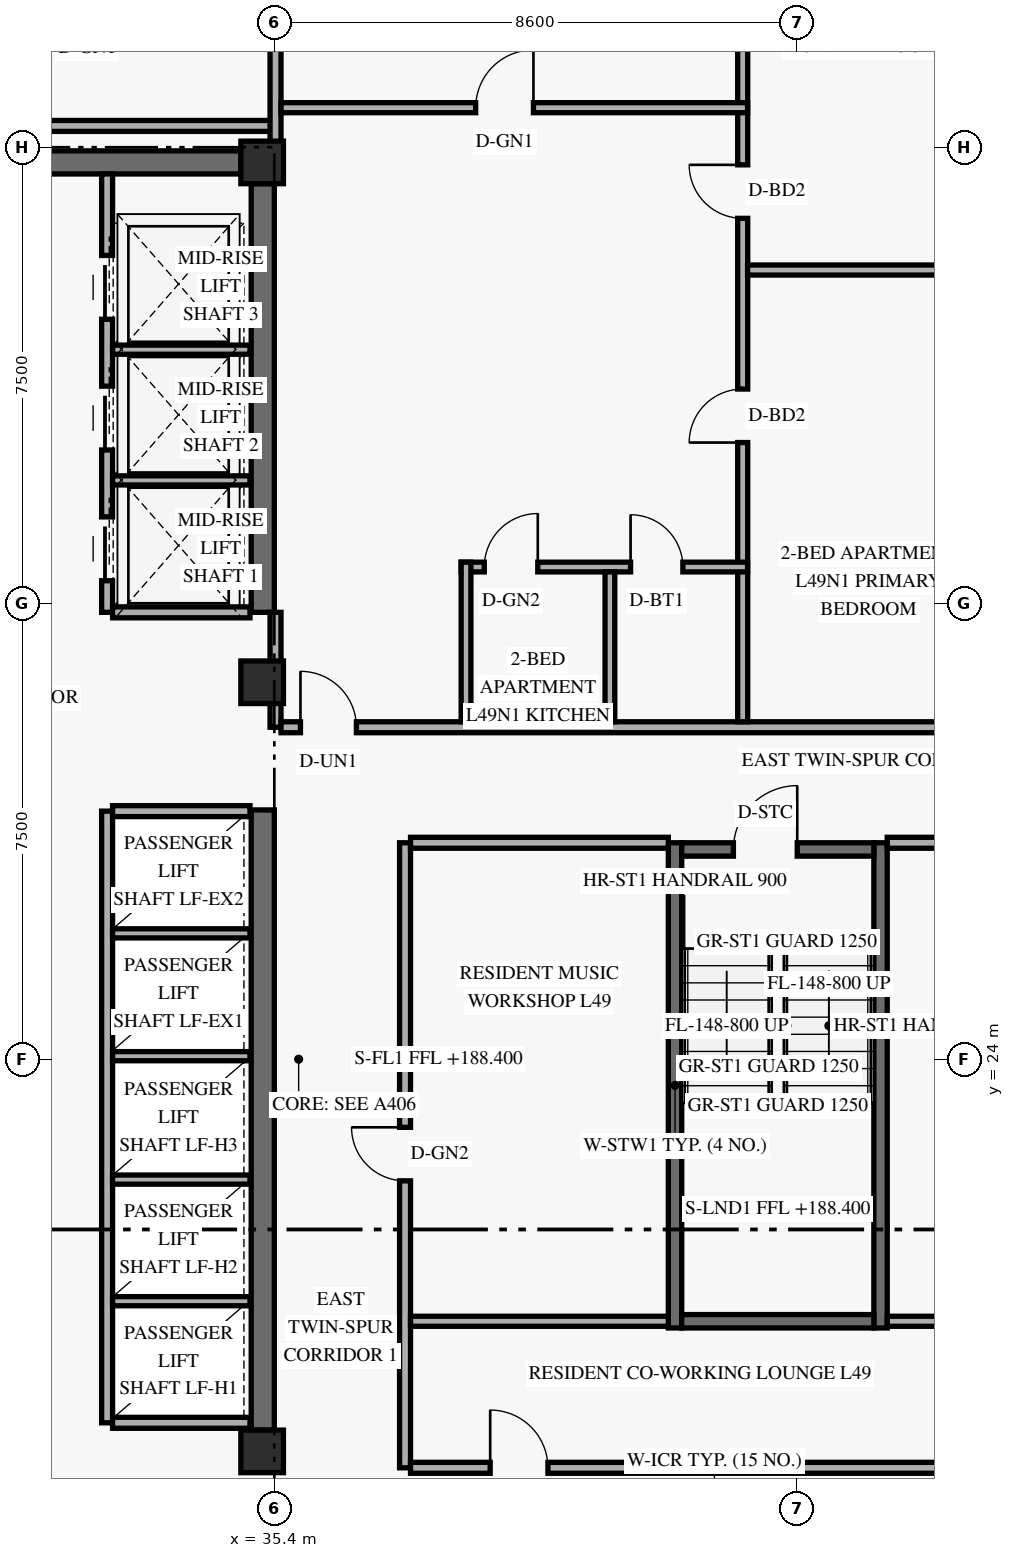
"""IFC4 building model, lengths in metres.
Left out: names, types, materials, properties, quantities, classifications, styles, units other than length and angle.
Written with IfcOpenShell. Run it as: python <this file> out.ifc"""

import sys

from ifc_helpers import new_model, si_unit, direction, frame, frame_2d, origin, origin_2d, place, context, subcontext, project, spatial, rectangle, extrude, element, fill, save


model = new_model("IFC4")
c1 = context("Model", 3, precision=1e-05, world=origin(), true_north=direction((0.0, 1.0)))
c2 = subcontext(c1, "Body", "Model", "MODEL_VIEW")
j1 = project(units=[si_unit("LENGTHUNIT", "METRE"), si_unit("PLANEANGLEUNIT", "RADIAN")], contexts=[c1])
p1 = place(None, origin())
s1 = spatial("IfcSite", under=j1, at=p1, CompositionType="ELEMENT")
p2 = place(p1, origin())
s2 = spatial("IfcBuilding", under=s1, at=p2, CompositionType="ELEMENT")
p3 = place(p2, frame((0.0, 0.0, 188.4)))
s3 = spatial("IfcBuildingStorey", under=s2, at=p3, CompositionType="ELEMENT", Elevation=188.4)
p4 = place(p3, frame((35.21, 17.9, 0.0), z_axis=(0.0, 0.0, 1.0), x_axis=(0.0, 1.0, 0.0)))
e1 = element("IfcWall", 1, at=p4, inside=s3, PredefinedType="SHEAR", context=c2, shape_type="SweptSolid", body=[
    extrude(rectangle(XDim=10.2, YDim=0.38, at=frame_2d((5.1, 0.0))), origin(), (0.0, 0.0, 1.0), 2.738),
])
p5 = place(p3, frame((35.21, 31.35, 0.0), z_axis=(0.0, 0.0, 1.0), x_axis=(0.0, 1.0, 0.0)))
e2 = element("IfcWall", 2, at=p5, inside=s3, PredefinedType="SHEAR", context=c2, shape_type="SweptSolid", body=[
    extrude(rectangle(XDim=7.05, YDim=0.38, at=frame_2d((3.525, 0.0))), origin(), (0.0, 0.0, 1.0), 2.738),
])
p6 = place(p3, frame((24.55, 38.75, 0.0), z_axis=(0.0, 0.0, 1.0), x_axis=(1.0, 0.0, 0.0)))
e3 = element("IfcWall", 3, at=p6, inside=s3, PredefinedType="SHEAR", context=c2, shape_type="SweptSolid", body=[
    extrude(rectangle(XDim=10.3, YDim=0.38, at=frame_2d((5.15, 0.0))), origin(), (0.0, 0.0, 1.0), 3.35),
])
p7 = place(p6, frame((5.2, 0.0, 0.0)))
e4 = element("IfcOpeningElement", 4, at=p7, cuts=e3, PredefinedType="OPENING", context=c2, shape_type="SweptSolid", body=[
    extrude(rectangle(XDim=1.05, YDim=2.15, at=frame_2d((0.525, 1.075))), frame((0.0, 0.2, 0.0), z_axis=(0.0, -1.0, 0.0), x_axis=(1.0, 0.0, 0.0)), (0.0, 0.0, 1.0), 0.4),
])
for number, where, z_axis, x_axis in (
    (5, (41.99, 19.58, 0.0), (0.0, 0.0, 1.0), (0.0, 1.0, 0.0)),
    (6, (45.37, 19.58, 0.0), (0.0, 0.0, 1.0), (0.0, 1.0, 0.0)),
):
    element("IfcWall", number, at=place(p3, frame(where, z_axis=z_axis, x_axis=x_axis)), inside=s3, PredefinedType="SHEAR", context=c2, shape_type="SweptSolid", body=[
        extrude(rectangle(XDim=7.98, YDim=0.22, at=frame_2d((3.99, 0.0))), origin(), (0.0, 0.0, 1.0), 2.739),
    ])
p8 = place(p3, frame((42.1, 19.69, 0.0), z_axis=(0.0, 0.0, 1.0), x_axis=(1.0, 0.0, 0.0)))
e7 = element("IfcWall", 7, at=p8, inside=s3, PredefinedType="SHEAR", context=c2, shape_type="SweptSolid", body=[
    extrude(rectangle(XDim=3.16, YDim=0.22, at=frame_2d((1.58, 0.0))), origin(), (0.0, 0.0, 1.0), 2.739),
])
p9 = place(p3, frame((42.1, 27.45, 0.0), z_axis=(0.0, 0.0, 1.0), x_axis=(1.0, 0.0, 0.0)))
e8 = element("IfcWall", 8, at=p9, inside=s3, PredefinedType="SHEAR", context=c2, shape_type="SweptSolid", body=[
    extrude(rectangle(XDim=3.16, YDim=0.22, at=frame_2d((1.58, 0.0))), origin(), (0.0, 0.0, 1.0), 2.739),
])
p10 = place(p9, frame((0.85, 0.0, 0.0)))
e9 = element("IfcOpeningElement", 9, at=p10, cuts=e8, PredefinedType="OPENING", context=c2, shape_type="SweptSolid", body=[
    extrude(rectangle(XDim=1.05, YDim=2.15, at=frame_2d((0.525, 1.075))), frame((0.0, 0.12, 0.0), z_axis=(0.0, -1.0, 0.0), x_axis=(1.0, 0.0, 0.0)), (0.0, 0.0, 1.0), 0.24),
])
for number, where, z_axis, x_axis in (
    (10, (35.2, 17.55, 0.0), (0.0, 0.0, 1.0), (1.0, 0.0, 0.0)),
    (11, (35.2, 30.2, 0.0), (0.0, 0.0, 1.0), (1.0, 0.0, 0.0)),
    (12, (35.2, 38.75, 0.0), (0.0, 0.0, 1.0), (1.0, 0.0, 0.0)),
):
    element("IfcColumn", number, at=place(p3, frame(where, z_axis=z_axis, x_axis=x_axis)), inside=s3, PredefinedType="COLUMN", context=c2, shape_type="SweptSolid", body=[
        extrude(rectangle(XDim=0.7, YDim=0.7, at=origin_2d()), origin(), (0.0, 0.0, 1.0), 3.6),
    ])
p11 = place(p3, frame((32.65, 18.02, 0.0), z_axis=(0.0, 0.0, 1.0), x_axis=(0.0, 1.0, 0.0)))
e13 = element("IfcWall", 13, at=p11, inside=s3, PredefinedType="STANDARD", context=c2, shape_type="SweptSolid", body=[
    extrude(rectangle(XDim=10.06, YDim=0.18, at=frame_2d((5.03, 0.0))), origin(), (0.0, 0.0, 1.0), 3.35),
])
for number, where, z_axis, x_axis in (
    (14, (32.74, 18.02, 0.0), (0.0, 0.0, 1.0), (1.0, 0.0, 0.0)),
    (15, (32.74, 28.08, 0.0), (0.0, 0.0, 1.0), (1.0, 0.0, 0.0)),
):
    element("IfcWall", number, at=place(p3, frame(where, z_axis=z_axis, x_axis=x_axis)), inside=s3, PredefinedType="STANDARD", context=c2, shape_type="SweptSolid", body=[
        extrude(rectangle(XDim=2.26, YDim=0.18, at=frame_2d((1.13, 0.0))), origin(), (0.0, 0.0, 1.0), 3.35),
    ])
for number, where, z_axis, x_axis in (
    (16, (32.74, 20.02, 0.0), (0.0, 0.0, 1.0), (1.0, 0.0, 0.0)),
    (17, (32.74, 22.02, 0.0), (0.0, 0.0, 1.0), (1.0, 0.0, 0.0)),
    (18, (32.74, 24.05, 0.0), (0.0, 0.0, 1.0), (1.0, 0.0, 0.0)),
    (19, (32.74, 26.07, 0.0), (0.0, 0.0, 1.0), (1.0, 0.0, 0.0)),
):
    element("IfcWall", number, at=place(p3, frame(where, z_axis=z_axis, x_axis=x_axis)), inside=s3, PredefinedType="STANDARD", context=c2, shape_type="SweptSolid", body=[
        extrude(rectangle(XDim=2.26, YDim=0.15, at=frame_2d((1.13, 0.0))), origin(), (0.0, 0.0, 1.0), 3.35),
    ])
p12 = place(p3, frame((32.65, 31.35, 0.0), z_axis=(0.0, 0.0, 1.0), x_axis=(0.0, 1.0, 0.0)))
e20 = element("IfcWall", 20, at=p12, inside=s3, PredefinedType="STANDARD", context=c2, shape_type="SweptSolid", body=[
    extrude(rectangle(XDim=7.21, YDim=0.18, at=frame_2d((3.605, 0.0))), origin(), (0.0, 0.0, 1.0), 3.35),
])
p13 = place(p12, frame((0.52, 0.0, 0.0)))
e21 = element("IfcOpeningElement", 21, at=p13, cuts=e20, PredefinedType="OPENING", context=c2, shape_type="SweptSolid", body=[
    extrude(rectangle(XDim=1.05, YDim=2.2, at=frame_2d((0.525, 1.1))), frame((0.0, 0.1, 0.0), z_axis=(0.0, -1.0, 0.0), x_axis=(1.0, 0.0, 0.0)), (0.0, 0.0, 1.0), 0.2),
])
p14 = place(p12, frame((2.67, 0.0, 0.0)))
e22 = element("IfcOpeningElement", 22, at=p14, cuts=e20, PredefinedType="OPENING", context=c2, shape_type="SweptSolid", body=[
    extrude(rectangle(XDim=1.05, YDim=2.2, at=frame_2d((0.525, 1.1))), frame((0.0, 0.1, 0.0), z_axis=(0.0, -1.0, 0.0), x_axis=(1.0, 0.0, 0.0)), (0.0, 0.0, 1.0), 0.2),
])
p15 = place(p12, frame((4.82, 0.0, 0.0)))
e23 = element("IfcOpeningElement", 23, at=p15, cuts=e20, PredefinedType="OPENING", context=c2, shape_type="SweptSolid", body=[
    extrude(rectangle(XDim=1.05, YDim=2.2, at=frame_2d((0.525, 1.1))), frame((0.0, 0.1, 0.0), z_axis=(0.0, -1.0, 0.0), x_axis=(1.0, 0.0, 0.0)), (0.0, 0.0, 1.0), 0.2),
])
p16 = place(p3, frame((32.74, 31.35, 0.0), z_axis=(0.0, 0.0, 1.0), x_axis=(1.0, 0.0, 0.0)))
e24 = element("IfcWall", 24, at=p16, inside=s3, PredefinedType="STANDARD", context=c2, shape_type="SweptSolid", body=[
    extrude(rectangle(XDim=2.26, YDim=0.18, at=frame_2d((1.13, 0.0))), origin(), (0.0, 0.0, 1.0), 3.35),
])
for number, where, z_axis, x_axis in (
    (25, (32.74, 33.52, 0.0), (0.0, 0.0, 1.0), (1.0, 0.0, 0.0)),
    (26, (32.74, 35.67, 0.0), (0.0, 0.0, 1.0), (1.0, 0.0, 0.0)),
):
    element("IfcWall", number, at=place(p3, frame(where, z_axis=z_axis, x_axis=x_axis)), inside=s3, PredefinedType="STANDARD", context=c2, shape_type="SweptSolid", body=[
        extrude(rectangle(XDim=2.26, YDim=0.15, at=frame_2d((1.13, 0.0))), origin(), (0.0, 0.0, 1.0), 3.35),
    ])
p17 = place(p3, frame((37.55, 17.28, 0.0), z_axis=(0.0, 0.0, 1.0), x_axis=(0.0, 1.0, 0.0)))
e27 = element("IfcWall", 27, at=p17, inside=s3, PredefinedType="STANDARD", context=c2, shape_type="SweptSolid", body=[
    extrude(rectangle(XDim=10.28, YDim=0.18, at=frame_2d((5.14, 0.0))), origin(), (0.0, 0.0, 1.0), 2.72),
])
p18 = place(p17, frame((4.72, 0.0, 0.0)))
e28 = element("IfcOpeningElement", 28, at=p18, cuts=e27, PredefinedType="OPENING", context=c2, shape_type="SweptSolid", body=[
    extrude(rectangle(XDim=0.88, YDim=2.12, at=frame_2d((0.44, 1.06))), frame((0.0, 0.1, 0.0), z_axis=(0.0, -1.0, 0.0), x_axis=(1.0, 0.0, 0.0)), (0.0, 0.0, 1.0), 0.2),
])
p19 = place(p3, frame((37.64, 17.28, 0.0), z_axis=(0.0, 0.0, 1.0), x_axis=(1.0, 0.0, 0.0)))
e29 = element("IfcWall", 29, at=p19, inside=s3, PredefinedType="STANDARD", context=c2, shape_type="SweptSolid", body=[
    extrude(rectangle(XDim=9.603, YDim=0.18, at=frame_2d((4.802, 0.0))), origin(), (0.0, 0.0, 1.0), 2.72),
])
p20 = place(p19, frame((1.31, 0.0, 0.0)))
e30 = element("IfcOpeningElement", 30, at=p20, cuts=e29, PredefinedType="OPENING", context=c2, shape_type="SweptSolid", body=[
    extrude(rectangle(XDim=0.95, YDim=2.15, at=frame_2d((0.475, 1.075))), frame((0.0, 0.1, 0.0), z_axis=(0.0, -1.0, 0.0), x_axis=(1.0, 0.0, 0.0)), (0.0, 0.0, 1.0), 0.2),
])
p21 = place(p3, frame((37.64, 27.56, 0.0), z_axis=(0.0, 0.0, 1.0), x_axis=(1.0, 0.0, 0.0)))
e31 = element("IfcWall", 31, at=p21, inside=s3, PredefinedType="STANDARD", context=c2, shape_type="SweptSolid", body=[
    extrude(rectangle(XDim=4.24, YDim=0.18, at=frame_2d((2.12, 0.0))), origin(), (0.0, 0.0, 1.0), 2.72),
])
p22 = place(p3, frame((45.48, 27.56, 0.0), z_axis=(0.0, 0.0, 1.0), x_axis=(1.0, 0.0, 0.0)))
e32 = element("IfcWall", 32, at=p22, inside=s3, PredefinedType="STANDARD", context=c2, shape_type="SweptSolid", body=[
    extrude(rectangle(XDim=1.763, YDim=0.18, at=frame_2d((0.881, 0.0))), origin(), (0.0, 0.0, 1.0), 2.72),
])
p23 = place(p3, frame((35.42, 29.46, 0.0), z_axis=(0.0, 0.0, 1.0), x_axis=(0.0, 1.0, 0.0)))
e33 = element("IfcWall", 33, at=p23, inside=s3, PredefinedType="STANDARD", context=c2, shape_type="SweptSolid", body=[
    extrude(rectangle(XDim=1.89, YDim=0.18, at=frame_2d((0.945, 0.0))), origin(), (0.0, 0.0, 1.0), 2.72),
])
p24 = place(p3, frame((35.51, 29.46, 0.0), z_axis=(0.0, 0.0, 1.0), x_axis=(1.0, 0.0, 0.0)))
e34 = element("IfcWall", 34, at=p24, inside=s3, PredefinedType="STANDARD", context=c2, shape_type="SweptSolid", body=[
    extrude(rectangle(XDim=11.733, YDim=0.18, at=frame_2d((5.866, 0.0))), origin(), (0.0, 0.0, 1.0), 2.72),
])
p25 = place(p24, frame((0.32, 0.0, 0.0)))
e35 = element("IfcOpeningElement", 35, at=p25, cuts=e34, PredefinedType="OPENING", context=c2, shape_type="SweptSolid", body=[
    extrude(rectangle(XDim=0.92, YDim=2.15, at=frame_2d((0.46, 1.075))), frame((0.0, 0.1, 0.0), z_axis=(0.0, -1.0, 0.0), x_axis=(1.0, 0.0, 0.0)), (0.0, 0.0, 1.0), 0.2),
])
p26 = place(p3, frame((23.85, 39.35, 0.0), z_axis=(0.0, 0.0, 1.0), x_axis=(1.0, 0.0, 0.0)))
e36 = element("IfcWall", 36, at=p26, inside=s3, PredefinedType="STANDARD", context=c2, shape_type="SweptSolid", body=[
    extrude(rectangle(XDim=11.57, YDim=0.18, at=frame_2d((5.785, 0.0))), origin(), (0.0, 0.0, 1.0), 2.72),
])
p27 = place(p3, frame((35.42, 38.75, 0.0), z_axis=(0.0, 0.0, 1.0), x_axis=(0.0, 1.0, 0.0)))
e37 = element("IfcWall", 37, at=p27, inside=s3, PredefinedType="PARTITIONING", context=c2, shape_type="SweptSolid", body=[
    extrude(rectangle(XDim=4.97, YDim=0.18, at=frame_2d((2.485, 0.0))), origin(), (0.0, 0.0, 1.0), 2.72),
])
p28 = place(p3, frame((43.103, 29.55, 0.0), z_axis=(0.0, 0.0, 1.0), x_axis=(0.0, 1.0, 0.0)))
e38 = element("IfcWall", 38, at=p28, inside=s3, PredefinedType="PARTITIONING", context=c2, shape_type="SweptSolid", body=[
    extrude(rectangle(XDim=14.17, YDim=0.165, at=frame_2d((7.085, 0.0))), origin(), (0.0, 0.0, 1.0), 2.72),
])
p29 = place(p28, frame((4.593, 0.0, 0.0)))
e39 = element("IfcOpeningElement", 39, at=p29, cuts=e38, PredefinedType="OPENING", context=c2, shape_type="SweptSolid", body=[
    extrude(rectangle(XDim=0.88, YDim=2.14, at=frame_2d((0.44, 1.07))), frame((0.0, 0.093, 0.0), z_axis=(0.0, -1.0, 0.0), x_axis=(1.0, 0.0, 0.0)), (0.0, 0.0, 1.0), 0.185),
])
p30 = place(p28, frame((8.28, 0.0, 0.0)))
e40 = element("IfcOpeningElement", 40, at=p30, cuts=e38, PredefinedType="OPENING", context=c2, shape_type="SweptSolid", body=[
    extrude(rectangle(XDim=0.88, YDim=2.14, at=frame_2d((0.44, 1.07))), frame((0.0, 0.093, 0.0), z_axis=(0.0, -1.0, 0.0), x_axis=(1.0, 0.0, 0.0)), (0.0, 0.0, 1.0), 0.185),
])
p31 = place(p3, frame((38.473, 32.095, 0.0), z_axis=(0.0, 0.0, 1.0), x_axis=(1.0, 0.0, 0.0)))
e41 = element("IfcWall", 41, at=p31, inside=s3, PredefinedType="PLUMBINGWALL", context=c2, shape_type="SweptSolid", body=[
    extrude(rectangle(XDim=4.71, YDim=0.16, at=frame_2d((2.355, 0.0))), origin(), (0.0, 0.0, 1.0), 3.35),
])
p32 = place(p31, frame((0.38, 0.0, 0.0)))
e42 = element("IfcOpeningElement", 42, at=p32, cuts=e41, PredefinedType="OPENING", context=c2, shape_type="SweptSolid", body=[
    extrude(rectangle(XDim=0.88, YDim=2.12, at=frame_2d((0.44, 1.06))), frame((0.0, 0.09, 0.0), z_axis=(0.0, -1.0, 0.0), x_axis=(1.0, 0.0, 0.0)), (0.0, 0.0, 1.0), 0.18),
])
p33 = place(p31, frame((2.786, 0.0, 0.0)))
e43 = element("IfcOpeningElement", 43, at=p33, cuts=e41, PredefinedType="OPENING", context=c2, shape_type="SweptSolid", body=[
    extrude(rectangle(XDim=0.86, YDim=2.12, at=frame_2d((0.43, 1.06))), frame((0.0, 0.09, 0.0), z_axis=(0.0, -1.0, 0.0), x_axis=(1.0, 0.0, 0.0)), (0.0, 0.0, 1.0), 0.18),
])
p34 = place(p3, frame((38.553, 29.55, 0.0), z_axis=(0.0, 0.0, 1.0), x_axis=(0.0, 1.0, 0.0)))
e44 = element("IfcWall", 44, at=p34, inside=s3, PredefinedType="PLUMBINGWALL", context=c2, shape_type="SweptSolid", body=[
    extrude(rectangle(XDim=2.625, YDim=0.16, at=frame_2d((1.312, 0.0))), origin(), (0.0, 0.0, 1.0), 2.72),
])
p35 = place(p3, frame((40.919, 29.55, 0.0), z_axis=(0.0, 0.0, 1.0), x_axis=(0.0, 1.0, 0.0)))
e45 = element("IfcWall", 45, at=p35, inside=s3, PredefinedType="PLUMBINGWALL", context=c2, shape_type="SweptSolid", body=[
    extrude(rectangle(XDim=2.465, YDim=0.16, at=frame_2d((1.232, 0.0))), origin(), (0.0, 0.0, 1.0), 2.72),
])
p36 = place(p3, frame((35.51, 39.65, 0.0), z_axis=(0.0, 0.0, 1.0), x_axis=(1.0, 0.0, 0.0)))
e46 = element("IfcWall", 46, at=p36, inside=s3, PredefinedType="PARTITIONING", context=c2, shape_type="SweptSolid", body=[
    extrude(rectangle(XDim=7.673, YDim=0.165, at=frame_2d((3.836, 0.0))), origin(), (0.0, 0.0, 1.0), 3.35),
])
p37 = place(p36, frame((3.201, 0.0, 0.0)))
e47 = element("IfcOpeningElement", 47, at=p37, cuts=e46, PredefinedType="OPENING", context=c2, shape_type="SweptSolid", body=[
    extrude(rectangle(XDim=0.95, YDim=2.15, at=frame_2d((0.475, 1.075))), frame((0.0, 0.093, 0.0), z_axis=(0.0, -1.0, 0.0), x_axis=(1.0, 0.0, 0.0)), (0.0, 0.0, 1.0), 0.185),
])
p38 = place(p3, frame((43.183, 36.98, 0.0), z_axis=(0.0, 0.0, 1.0), x_axis=(1.0, 0.0, 0.0)))
e48 = element("IfcWall", 48, at=p38, inside=s3, PredefinedType="PARTITIONING", context=c2, shape_type="SweptSolid", body=[
    extrude(rectangle(XDim=3.97, YDim=0.165, at=frame_2d((1.985, 0.0))), origin(), (0.0, 0.0, 1.0), 2.72),
])
p39 = place(p3, frame((37.64, 19.69, 0.0), z_axis=(0.0, 0.0, 1.0), x_axis=(1.0, 0.0, 0.0)))
e49 = element("IfcWall", 49, at=p39, inside=s3, PredefinedType="PARTITIONING", context=c2, shape_type="SweptSolid", body=[
    extrude(rectangle(XDim=4.24, YDim=0.165, at=frame_2d((2.12, 0.0))), origin(), (0.0, 0.0, 1.0), 2.72),
])
p40 = place(p3, frame((45.48, 19.69, 0.0), z_axis=(0.0, 0.0, 1.0), x_axis=(1.0, 0.0, 0.0)))
e50 = element("IfcWall", 50, at=p40, inside=s3, PredefinedType="PARTITIONING", context=c2, shape_type="SweptSolid", body=[
    extrude(rectangle(XDim=1.763, YDim=0.165, at=frame_2d((0.881, 0.0))), origin(), (0.0, 0.0, 1.0), 2.72),
])
p41 = place(p13, origin())
e51 = element("IfcDoor", 51, at=p41, inside=s3, OperationType="SLIDING_TO_LEFT", PredefinedType="DOOR", context=c2, shape_type="SweptSolid", body=[
    extrude(rectangle(XDim=1.05, YDim=2.2, at=frame_2d((0.525, 1.1))), frame((0.0, 0.025, 0.0), z_axis=(0.0, -1.0, 0.0), x_axis=(1.0, 0.0, 0.0)), (0.0, 0.0, 1.0), 0.05),
])
fill(e21, e51)
p42 = place(p14, origin())
e52 = element("IfcDoor", 52, at=p42, inside=s3, OperationType="SLIDING_TO_LEFT", PredefinedType="DOOR", context=c2, shape_type="SweptSolid", body=[
    extrude(rectangle(XDim=1.05, YDim=2.2, at=frame_2d((0.525, 1.1))), frame((0.0, 0.025, 0.0), z_axis=(0.0, -1.0, 0.0), x_axis=(1.0, 0.0, 0.0)), (0.0, 0.0, 1.0), 0.05),
])
fill(e22, e52)
p43 = place(p15, origin())
e53 = element("IfcDoor", 53, at=p43, inside=s3, OperationType="SLIDING_TO_LEFT", PredefinedType="DOOR", context=c2, shape_type="SweptSolid", body=[
    extrude(rectangle(XDim=1.05, YDim=2.2, at=frame_2d((0.525, 1.1))), frame((0.0, 0.025, 0.0), z_axis=(0.0, -1.0, 0.0), x_axis=(1.0, 0.0, 0.0)), (0.0, 0.0, 1.0), 0.05),
])
fill(e23, e53)
p44 = place(p10, frame((1.05, 0.0, 0.0), z_axis=(0.0, 0.0, 1.0), x_axis=(-1.0, 0.0, 0.0)))
e54 = element("IfcDoor", 54, at=p44, inside=s3, OperationType="SINGLE_SWING_LEFT", PredefinedType="DOOR", context=c2, shape_type="SweptSolid", body=[
    extrude(rectangle(XDim=1.05, YDim=2.15, at=frame_2d((0.525, 1.075))), frame((0.0, 0.025, 0.0), z_axis=(0.0, -1.0, 0.0), x_axis=(1.0, 0.0, 0.0)), (0.0, 0.0, 1.0), 0.05),
])
fill(e9, e54)
p45 = place(p37, origin())
e55 = element("IfcDoor", 55, at=p45, inside=s3, OperationType="SINGLE_SWING_RIGHT", PredefinedType="DOOR", context=c2, shape_type="SweptSolid", body=[
    extrude(rectangle(XDim=0.95, YDim=2.15, at=frame_2d((0.475, 1.075))), frame((0.0, 0.025, 0.0), z_axis=(0.0, -1.0, 0.0), x_axis=(1.0, 0.0, 0.0)), (0.0, 0.0, 1.0), 0.05),
])
fill(e47, e55)
p46 = place(p25, origin())
e56 = element("IfcDoor", 56, at=p46, inside=s3, OperationType="SINGLE_SWING_LEFT", PredefinedType="DOOR", context=c2, shape_type="SweptSolid", body=[
    extrude(rectangle(XDim=0.92, YDim=2.15, at=frame_2d((0.46, 1.075))), frame((0.0, 0.025, 0.0), z_axis=(0.0, -1.0, 0.0), x_axis=(1.0, 0.0, 0.0)), (0.0, 0.0, 1.0), 0.05),
])
fill(e35, e56)
p47 = place(p32, origin())
e57 = element("IfcDoor", 57, at=p47, inside=s3, OperationType="SINGLE_SWING_RIGHT", PredefinedType="DOOR", context=c2, shape_type="SweptSolid", body=[
    extrude(rectangle(XDim=0.88, YDim=2.12, at=frame_2d((0.44, 1.06))), frame((0.0, 0.025, 0.0), z_axis=(0.0, -1.0, 0.0), x_axis=(1.0, 0.0, 0.0)), (0.0, 0.0, 1.0), 0.05),
])
fill(e42, e57)
p48 = place(p33, origin())
e58 = element("IfcDoor", 58, at=p48, inside=s3, OperationType="SINGLE_SWING_LEFT", PredefinedType="DOOR", context=c2, shape_type="SweptSolid", body=[
    extrude(rectangle(XDim=0.86, YDim=2.12, at=frame_2d((0.43, 1.06))), frame((0.0, 0.025, 0.0), z_axis=(0.0, -1.0, 0.0), x_axis=(1.0, 0.0, 0.0)), (0.0, 0.0, 1.0), 0.05),
])
fill(e43, e58)
p49 = place(p29, origin())
e59 = element("IfcDoor", 59, at=p49, inside=s3, OperationType="SINGLE_SWING_LEFT", PredefinedType="DOOR", context=c2, shape_type="SweptSolid", body=[
    extrude(rectangle(XDim=0.88, YDim=2.14, at=frame_2d((0.44, 1.07))), frame((0.0, 0.025, 0.0), z_axis=(0.0, -1.0, 0.0), x_axis=(1.0, 0.0, 0.0)), (0.0, 0.0, 1.0), 0.05),
])
fill(e39, e59)
p50 = place(p30, origin())
e60 = element("IfcDoor", 60, at=p50, inside=s3, OperationType="SINGLE_SWING_RIGHT", PredefinedType="DOOR", context=c2, shape_type="SweptSolid", body=[
    extrude(rectangle(XDim=0.88, YDim=2.14, at=frame_2d((0.44, 1.07))), frame((0.0, 0.025, 0.0), z_axis=(0.0, -1.0, 0.0), x_axis=(1.0, 0.0, 0.0)), (0.0, 0.0, 1.0), 0.05),
])
fill(e40, e60)
p51 = place(p20, origin())
e61 = element("IfcDoor", 61, at=p51, inside=s3, OperationType="SINGLE_SWING_LEFT", PredefinedType="DOOR", context=c2, shape_type="SweptSolid", body=[
    extrude(rectangle(XDim=0.95, YDim=2.15, at=frame_2d((0.475, 1.075))), frame((0.0, 0.025, 0.0), z_axis=(0.0, -1.0, 0.0), x_axis=(1.0, 0.0, 0.0)), (0.0, 0.0, 1.0), 0.05),
])
fill(e30, e61)
p52 = place(p18, origin())
e62 = element("IfcDoor", 62, at=p52, inside=s3, OperationType="SINGLE_SWING_RIGHT", PredefinedType="DOOR", context=c2, shape_type="SweptSolid", body=[
    extrude(rectangle(XDim=0.88, YDim=2.12, at=frame_2d((0.44, 1.06))), frame((0.0, 0.025, 0.0), z_axis=(0.0, -1.0, 0.0), x_axis=(1.0, 0.0, 0.0)), (0.0, 0.0, 1.0), 0.05),
])
fill(e28, e62)
save(model, sys.argv[1])
